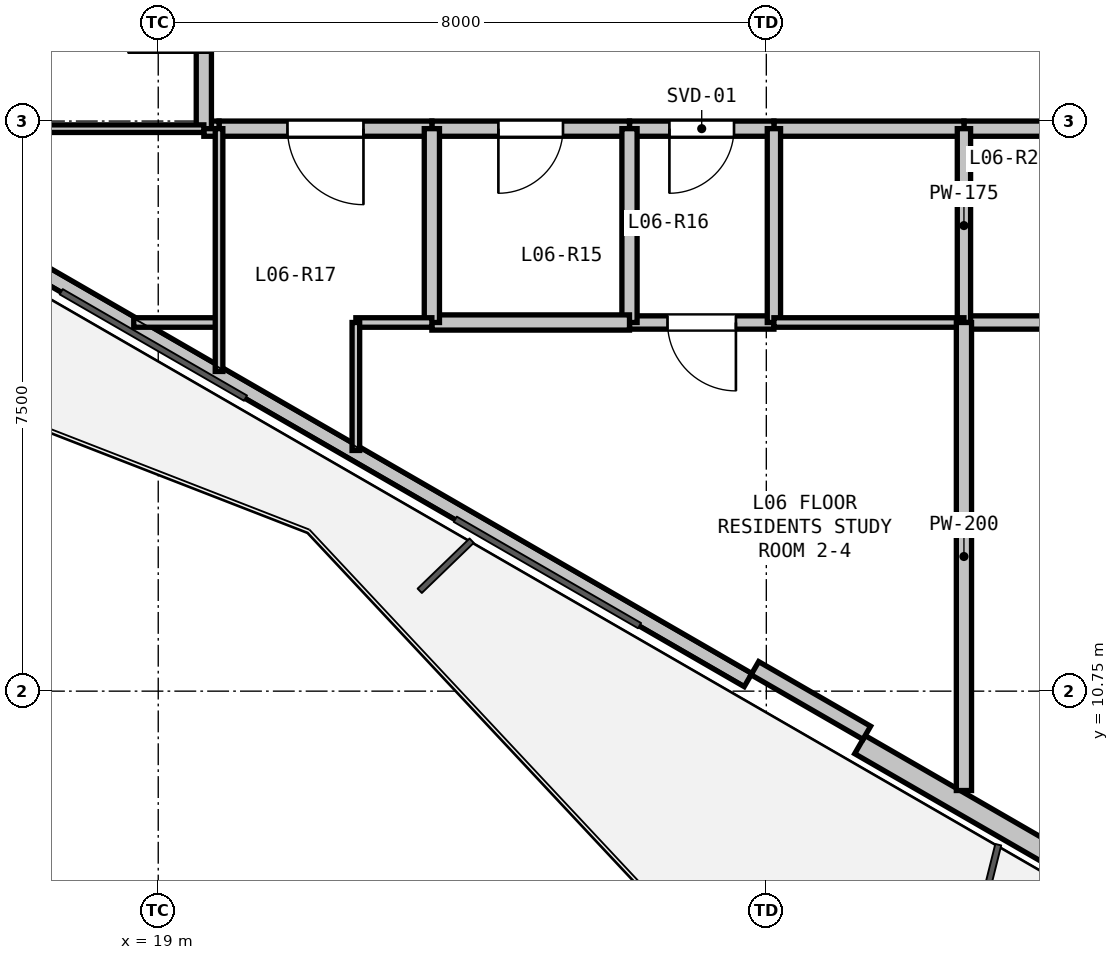
"""IFC4 building model, lengths in metres.
Left out: names, types, materials, properties, quantities, classifications, styles, units other than length and angle.
Written with IfcOpenShell. Run it as: python <this file> out.ifc"""

import sys

from ifc_helpers import new_model, si_unit, direction, frame, frame_2d, origin, place, context, subcontext, project, spatial, rectangle, extrude, element, fill, save


model = new_model("IFC4")
c1 = context("Model", 3, precision=1e-05, world=origin(), true_north=direction((0.0, 1.0)))
c2 = subcontext(c1, "Body", "Model", "MODEL_VIEW")
j1 = project(units=[si_unit("LENGTHUNIT", "METRE"), si_unit("PLANEANGLEUNIT", "RADIAN")], contexts=[c1])
p1 = place(None, origin())
s1 = spatial("IfcSite", under=j1, at=p1, CompositionType="ELEMENT")
p2 = place(p1, origin())
s2 = spatial("IfcBuilding", under=s1, at=p2, CompositionType="ELEMENT")
p3 = place(p2, frame((0.0, 0.0, 25.8)))
s3 = spatial("IfcBuildingStorey", under=s2, at=p3, CompositionType="ELEMENT", Elevation=25.8)
p4 = place(p3, frame((39.207, 3.71, 0.0), z_axis=(0.0, 0.0, 1.0), x_axis=(-0.86603192154, 0.499988710747, 0.0)))
e1 = element("IfcWall", 1, at=p4, inside=s3, PredefinedType="SOLIDWALL", context=c2, shape_type="SweptSolid", body=[
    extrude(rectangle(XDim=12.673, YDim=0.275, at=frame_2d((6.336, 0.0))), origin(), (0.0, 0.0, 1.0), 2.66),
])
p5 = place(p4, frame((8.136, 0.0, 0.0)))
e2 = element("IfcOpeningElement", 2, at=p5, cuts=e1, PredefinedType="OPENING", context=c2, shape_type="SweptSolid", body=[
    extrude(rectangle(XDim=1.1, YDim=2.1, at=frame_2d((0.55, 1.05))), frame((0.0, 0.147, 0.0), z_axis=(0.0, -1.0, 0.0), x_axis=(1.0, 0.0, 0.0)), (0.0, 0.0, 1.0), 0.295),
])
p6 = place(p4, frame((2.216, 0.0, 0.9)))
e3 = element("IfcOpeningElement", 3, at=p6, cuts=e1, PredefinedType="OPENING", context=c2, shape_type="SweptSolid", body=[
    extrude(rectangle(XDim=1.2, YDim=1.4, at=frame_2d((0.6, 0.7))), frame((0.0, 0.147, 0.0), z_axis=(0.0, -1.0, 0.0), x_axis=(1.0, 0.0, 0.0)), (0.0, 0.0, 1.0), 0.295),
])
p7 = place(p3, frame((26.76, 10.896, 0.0), z_axis=(0.0, 0.0, 1.0), x_axis=(-0.866027351828, 0.499996625875, 0.0)))
e4 = element("IfcWall", 4, at=p7, inside=s3, PredefinedType="PARAPET", context=c2, shape_type="SweptSolid", body=[
    extrude(rectangle(XDim=11.973, YDim=0.2, at=frame_2d((5.987, 0.0))), origin(), (0.0, 0.0, 1.0), 0.2),
])
p8 = place(p3, frame((28.322, 10.202, 0.0), z_axis=(0.0, 0.0, 1.0), x_axis=(-0.86605165483, 0.499954529098, 0.0)))
e5 = element("IfcWall", 5, at=p8, inside=s3, PredefinedType="PARAPET", context=c2, shape_type="SweptSolid", body=[
    extrude(rectangle(XDim=1.7, YDim=0.2, at=frame_2d((0.85, 0.0))), origin(), (0.0, 0.0, 1.0), 2.66),
])
p9 = place(p3, frame((31.6, 18.15, 0.0), z_axis=(0.0, 0.0, 1.0), x_axis=(-1.0, 0.0, 0.0)))
e6 = element("IfcWall", 6, at=p9, inside=s3, PredefinedType="PARTITIONING", context=c2, shape_type="SweptSolid", body=[
    extrude(rectangle(XDim=2.0, YDim=0.2, at=frame_2d((1.0, 0.0))), origin(), (0.0, 0.0, 1.0), 3.04),
])
p10 = place(p3, frame((29.6, 18.15, 0.0), z_axis=(0.0, 0.0, 1.0), x_axis=(-1.0, 0.0, 0.0)))
e7 = element("IfcWall", 7, at=p10, inside=s3, PredefinedType="PARTITIONING", context=c2, shape_type="SweptSolid", body=[
    extrude(rectangle(XDim=2.5, YDim=0.2, at=frame_2d((1.25, 0.0))), origin(), (0.0, 0.0, 1.0), 3.04),
])
p11 = place(p3, frame((27.1, 18.15, 0.0), z_axis=(0.0, 0.0, 1.0), x_axis=(-1.0, 0.0, 0.0)))
e8 = element("IfcWall", 8, at=p11, inside=s3, PredefinedType="PARTITIONING", context=c2, shape_type="SweptSolid", body=[
    extrude(rectangle(XDim=1.9, YDim=0.2, at=frame_2d((0.95, 0.0))), origin(), (0.0, 0.0, 1.0), 3.04),
])
p12 = place(p11, frame((0.525, 0.0, 0.0)))
e9 = element("IfcOpeningElement", 9, at=p12, cuts=e8, PredefinedType="OPENING", context=c2, shape_type="SweptSolid", body=[
    extrude(rectangle(XDim=0.85, YDim=2.1, at=frame_2d((0.425, 1.05))), frame((0.0, 0.11, 0.0), z_axis=(0.0, -1.0, 0.0), x_axis=(1.0, 0.0, 0.0)), (0.0, 0.0, 1.0), 0.22),
])
p13 = place(p3, frame((25.2, 18.15, 0.0), z_axis=(0.0, 0.0, 1.0), x_axis=(-1.0, 0.0, 0.0)))
e10 = element("IfcWall", 10, at=p13, inside=s3, PredefinedType="PARTITIONING", context=c2, shape_type="SweptSolid", body=[
    extrude(rectangle(XDim=2.6, YDim=0.2, at=frame_2d((1.3, 0.0))), origin(), (0.0, 0.0, 1.0), 2.337),
])
p14 = place(p13, frame((0.875, 0.0, 0.0)))
e11 = element("IfcOpeningElement", 11, at=p14, cuts=e10, PredefinedType="OPENING", context=c2, shape_type="SweptSolid", body=[
    extrude(rectangle(XDim=0.85, YDim=2.1, at=frame_2d((0.425, 1.05))), frame((0.0, 0.11, 0.0), z_axis=(0.0, -1.0, 0.0), x_axis=(1.0, 0.0, 0.0)), (0.0, 0.0, 1.0), 0.22),
])
p15 = place(p3, frame((22.6, 18.15, 0.0), z_axis=(0.0, 0.0, 1.0), x_axis=(-1.0, 0.0, 0.0)))
e12 = element("IfcWall", 12, at=p15, inside=s3, PredefinedType="PARTITIONING", context=c2, shape_type="SweptSolid", body=[
    extrude(rectangle(XDim=2.8, YDim=0.2, at=frame_2d((1.4, 0.0))), origin(), (0.0, 0.0, 1.0), 3.04),
])
p16 = place(p15, frame((0.9, 0.0, 0.0)))
e13 = element("IfcOpeningElement", 13, at=p16, cuts=e12, PredefinedType="OPENING", context=c2, shape_type="SweptSolid", body=[
    extrude(rectangle(XDim=1.0, YDim=2.15, at=frame_2d((0.5, 1.075))), frame((0.0, 0.11, 0.0), z_axis=(0.0, -1.0, 0.0), x_axis=(1.0, 0.0, 0.0)), (0.0, 0.0, 1.0), 0.22),
])
p17 = place(p3, frame((19.8, 18.15, 0.0), z_axis=(0.0, 0.0, 1.0), x_axis=(-1.0, 0.0, 0.0)))
e14 = element("IfcWall", 14, at=p17, inside=s3, PredefinedType="PARTITIONING", context=c2, shape_type="SweptSolid", body=[
    extrude(rectangle(XDim=0.2, YDim=0.2, at=frame_2d((0.1, 0.0))), origin(), (0.0, 0.0, 1.0), 3.04),
])
p18 = place(p3, frame((19.6, 18.15, 0.0), z_axis=(0.0, 0.0, 1.0), x_axis=(0.0, 1.0, 0.0)))
e15 = element("IfcWall", 15, at=p18, inside=s3, PredefinedType="PARTITIONING", context=c2, shape_type="SweptSolid", body=[
    extrude(rectangle(XDim=3.0, YDim=0.2, at=frame_2d((1.5, 0.0))), origin(), (0.0, 0.0, 1.0), 2.337),
])
p19 = place(p18, frame((1.0, 0.0, 0.0)))
e16 = element("IfcOpeningElement", 16, at=p19, cuts=e15, PredefinedType="OPENING", context=c2, shape_type="SweptSolid", body=[
    extrude(rectangle(XDim=1.0, YDim=2.15, at=frame_2d((0.5, 1.075))), frame((0.0, 0.11, 0.0), z_axis=(0.0, -1.0, 0.0), x_axis=(1.0, 0.0, 0.0)), (0.0, 0.0, 1.0), 0.22),
])
p20 = place(p3, frame((27.1, 15.6, 0.0), z_axis=(0.0, 0.0, 1.0), x_axis=(-1.0, 0.0, 0.0)))
e17 = element("IfcWall", 17, at=p20, inside=s3, PredefinedType="PLUMBINGWALL", context=c2, shape_type="SweptSolid", body=[
    extrude(rectangle(XDim=1.9, YDim=0.175, at=frame_2d((0.95, 0.0))), origin(), (0.0, 0.0, 1.0), 2.337),
])
p21 = place(p20, frame((0.5, 0.0, 0.0)))
e18 = element("IfcOpeningElement", 18, at=p21, cuts=e17, PredefinedType="OPENING", context=c2, shape_type="SweptSolid", body=[
    extrude(rectangle(XDim=0.9, YDim=2.1, at=frame_2d((0.45, 1.05))), frame((0.0, 0.097, 0.0), z_axis=(0.0, -1.0, 0.0), x_axis=(1.0, 0.0, 0.0)), (0.0, 0.0, 1.0), 0.195),
])
p22 = place(p3, frame((25.2, 15.6, 0.0), z_axis=(0.0, 0.0, 1.0), x_axis=(0.0, 1.0, 0.0)))
e19 = element("IfcWall", 19, at=p22, inside=s3, PredefinedType="PARTITIONING", context=c2, shape_type="SweptSolid", body=[
    extrude(rectangle(XDim=2.55, YDim=0.2, at=frame_2d((1.275, 0.0))), origin(), (0.0, 0.0, 1.0), 2.337),
])
p23 = place(p3, frame((27.1, 18.15, 0.0), z_axis=(0.0, 0.0, 1.0), x_axis=(0.0, -1.0, 0.0)))
e20 = element("IfcWall", 20, at=p23, inside=s3, PredefinedType="PLUMBINGWALL", context=c2, shape_type="SweptSolid", body=[
    extrude(rectangle(XDim=2.55, YDim=0.175, at=frame_2d((1.275, 0.0))), origin(), (0.0, 0.0, 1.0), 3.04),
])
p24 = place(p3, frame((31.6, 15.6, 0.0), z_axis=(0.0, 0.0, 1.0), x_axis=(-1.0, 0.0, 0.0)))
e21 = element("IfcWall", 21, at=p24, inside=s3, PredefinedType="PLUMBINGWALL", context=c2, shape_type="SweptSolid", body=[
    extrude(rectangle(XDim=2.0, YDim=0.175, at=frame_2d((1.0, 0.0))), origin(), (0.0, 0.0, 1.0), 3.04),
])
p25 = place(p3, frame((29.6, 15.6, 0.0), z_axis=(0.0, 0.0, 1.0), x_axis=(0.0, 1.0, 0.0)))
e22 = element("IfcWall", 22, at=p25, inside=s3, PredefinedType="PLUMBINGWALL", context=c2, shape_type="SweptSolid", body=[
    extrude(rectangle(XDim=2.55, YDim=0.175, at=frame_2d((1.275, 0.0))), origin(), (0.0, 0.0, 1.0), 3.04),
])
p26 = place(p3, frame((19.6, 18.15, 0.0), z_axis=(0.0, 0.0, 1.0), x_axis=(-1.0, 0.0, 0.0)))
e23 = element("IfcWall", 23, at=p26, inside=s3, PredefinedType="PARTITIONING", context=c2, shape_type="SweptSolid", body=[
    extrude(rectangle(XDim=2.45, YDim=0.1, at=frame_2d((1.225, 0.0))), origin(), (0.0, 0.0, 1.0), 3.04),
])
p27 = place(p3, frame((25.2, 15.6, 0.0), z_axis=(0.0, 0.0, 1.0), x_axis=(-1.0, 0.0, 0.0)))
e24 = element("IfcWall", 24, at=p27, inside=s3, PredefinedType="PARTITIONING", context=c2, shape_type="SweptSolid", body=[
    extrude(rectangle(XDim=2.6, YDim=0.2, at=frame_2d((1.3, 0.0))), origin(), (0.0, 0.0, 1.0), 3.04),
])
p28 = place(p3, frame((22.6, 15.6, 0.0), z_axis=(0.0, 0.0, 1.0), x_axis=(0.0, 1.0, 0.0)))
e25 = element("IfcWall", 25, at=p28, inside=s3, PredefinedType="PARTITIONING", context=c2, shape_type="SweptSolid", body=[
    extrude(rectangle(XDim=2.55, YDim=0.2, at=frame_2d((1.275, 0.0))), origin(), (0.0, 0.0, 1.0), 3.04),
])
p29 = place(p3, frame((22.6, 15.6, 0.0), z_axis=(0.0, 0.0, 1.0), x_axis=(-1.0, 0.0, 0.0)))
e26 = element("IfcWall", 26, at=p29, inside=s3, PredefinedType="PARTITIONING", context=c2, shape_type="SweptSolid", body=[
    extrude(rectangle(XDim=1.0, YDim=0.125, at=frame_2d((0.5, 0.0))), origin(), (0.0, 0.0, 1.0), 3.04),
])
p30 = place(p3, frame((21.6, 15.6, 0.0), z_axis=(0.0, 0.0, 1.0), x_axis=(0.0, -1.0, 0.0)))
e27 = element("IfcWall", 27, at=p30, inside=s3, PredefinedType="PARTITIONING", context=c2, shape_type="SweptSolid", body=[
    extrude(rectangle(XDim=1.684, YDim=0.1, at=frame_2d((0.842, 0.0))), origin(), (0.0, 0.0, 1.0), 2.365),
])
p31 = place(p3, frame((18.678, 15.6, 0.0), z_axis=(0.0, 0.0, 1.0), x_axis=(1.0, 0.0, 0.0)))
e28 = element("IfcWall", 28, at=p31, inside=s3, PredefinedType="PARTITIONING", context=c2, shape_type="SweptSolid", body=[
    extrude(rectangle(XDim=1.122, YDim=0.125, at=frame_2d((0.561, 0.0))), origin(), (0.0, 0.0, 1.0), 2.365),
])
p32 = place(p3, frame((19.8, 14.956, 0.0), z_axis=(0.0, 0.0, 1.0), x_axis=(0.0, 1.0, 0.0)))
e29 = element("IfcWall", 29, at=p32, inside=s3, PredefinedType="PARTITIONING", context=c2, shape_type="SweptSolid", body=[
    extrude(rectangle(XDim=3.194, YDim=0.1, at=frame_2d((1.597, 0.0))), origin(), (0.0, 0.0, 1.0), 2.365),
])
p33 = place(p3, frame((27.1, 15.6, 0.0), z_axis=(0.0, 0.0, 1.0), x_axis=(1.0, 0.0, 0.0)))
e30 = element("IfcWall", 30, at=p33, inside=s3, PredefinedType="PARTITIONING", context=c2, shape_type="SweptSolid", body=[
    extrude(rectangle(XDim=2.5, YDim=0.125, at=frame_2d((1.25, 0.0))), origin(), (0.0, 0.0, 1.0), 3.04),
])
p34 = place(p3, frame((29.6, 15.6, 0.0), z_axis=(0.0, 0.0, 1.0), x_axis=(0.0, -1.0, 0.0)))
e31 = element("IfcWall", 31, at=p34, inside=s3, PredefinedType="PARTITIONING", context=c2, shape_type="SweptSolid", body=[
    extrude(rectangle(XDim=6.157, YDim=0.2, at=frame_2d((3.079, 0.0))), origin(), (0.0, 0.0, 1.0), 2.337),
])
p35 = place(p12, origin())
e32 = element("IfcDoor", 32, at=p35, inside=s3, OperationType="SINGLE_SWING_RIGHT", PredefinedType="DOOR", context=c2, shape_type="SweptSolid", body=[
    extrude(rectangle(XDim=0.85, YDim=2.1, at=frame_2d((0.425, 1.05))), frame((0.0, 0.025, 0.0), z_axis=(0.0, -1.0, 0.0), x_axis=(1.0, 0.0, 0.0)), (0.0, 0.0, 1.0), 0.05),
])
fill(e9, e32)
p36 = place(p14, origin())
e33 = element("IfcDoor", 33, at=p36, inside=s3, OperationType="SINGLE_SWING_RIGHT", PredefinedType="DOOR", context=c2, shape_type="SweptSolid", body=[
    extrude(rectangle(XDim=0.85, YDim=2.1, at=frame_2d((0.425, 1.05))), frame((0.0, 0.025, 0.0), z_axis=(0.0, -1.0, 0.0), x_axis=(1.0, 0.0, 0.0)), (0.0, 0.0, 1.0), 0.05),
])
fill(e11, e33)
p37 = place(p16, origin())
e34 = element("IfcDoor", 34, at=p37, inside=s3, OperationType="SINGLE_SWING_LEFT", PredefinedType="DOOR", context=c2, shape_type="SweptSolid", body=[
    extrude(rectangle(XDim=1.0, YDim=2.15, at=frame_2d((0.5, 1.075))), frame((0.0, 0.025, 0.0), z_axis=(0.0, -1.0, 0.0), x_axis=(1.0, 0.0, 0.0)), (0.0, 0.0, 1.0), 0.05),
])
fill(e13, e34)
p38 = place(p21, origin())
e35 = element("IfcDoor", 35, at=p38, inside=s3, OperationType="SINGLE_SWING_LEFT", PredefinedType="DOOR", context=c2, shape_type="SweptSolid", body=[
    extrude(rectangle(XDim=0.9, YDim=2.1, at=frame_2d((0.45, 1.05))), frame((0.0, 0.025, 0.0), z_axis=(0.0, -1.0, 0.0), x_axis=(1.0, 0.0, 0.0)), (0.0, 0.0, 1.0), 0.05),
])
fill(e18, e35)
save(model, sys.argv[1])
